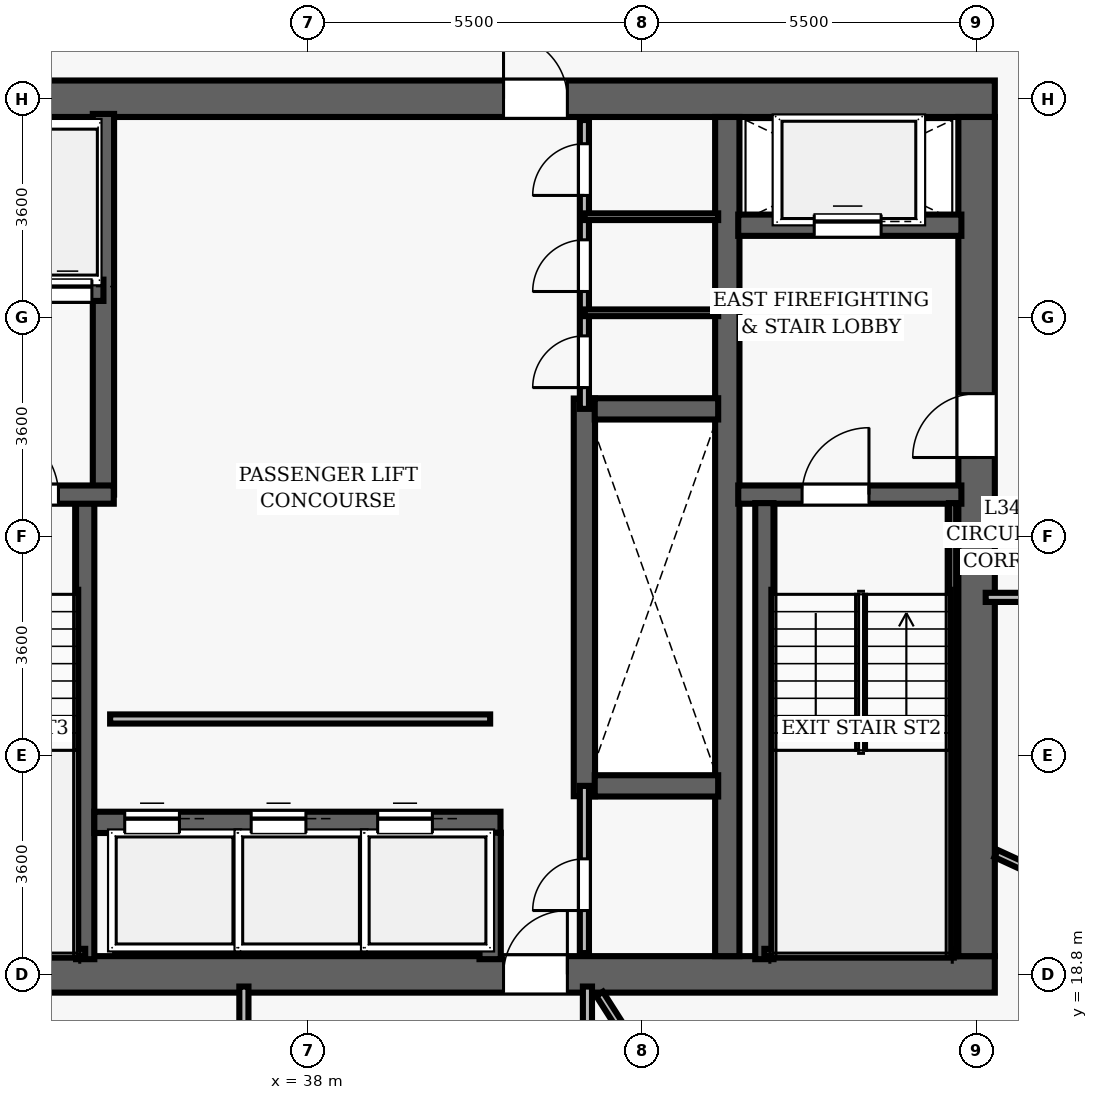
"""IFC4 building model, lengths in metres.
Left out: names, types, materials, properties, quantities, classifications, styles, units other than length and angle.
Written with IfcOpenShell. Run it as: python <this file> out.ifc"""

import sys

from ifc_helpers import new_model, si_unit, direction, frame, frame_2d, origin, place, context, subcontext, project, spatial, rectangle, extrude, element, fill, save


model = new_model("IFC4")
c1 = context("Model", 3, precision=1e-05, world=origin(), true_north=direction((0.0, 1.0)))
c2 = subcontext(c1, "Body", "Model", "MODEL_VIEW")
j1 = project(units=[si_unit("LENGTHUNIT", "METRE"), si_unit("PLANEANGLEUNIT", "RADIAN")], contexts=[c1])
p1 = place(None, origin())
s1 = spatial("IfcSite", under=j1, at=p1, CompositionType="ELEMENT")
p2 = place(p1, origin())
s2 = spatial("IfcBuilding", under=s1, at=p2, CompositionType="ELEMENT")
p3 = place(p2, frame((0.0, 0.0, 137.8)))
s3 = spatial("IfcBuildingStorey", under=s2, at=p3, CompositionType="ELEMENT", Elevation=137.8)
p4 = place(p3, frame((26.7, 18.8, 0.0), z_axis=(0.0, 0.0, 1.0), x_axis=(1.0, 0.0, 0.0)))
e1 = element("IfcWall", 1, at=p4, inside=s3, PredefinedType="SHEAR", context=c2, shape_type="SweptSolid", body=[
    extrude(rectangle(XDim=22.6, YDim=0.6, at=frame_2d((11.3, 0.0))), origin(), (0.0, 0.0, 1.0), 3.5),
])
p5 = place(p4, frame((14.52, 0.0, 0.0)))
e2 = element("IfcOpeningElement", 2, at=p5, cuts=e1, PredefinedType="OPENING", context=c2, shape_type="SweptSolid", body=[
    extrude(rectangle(XDim=1.05, YDim=2.15, at=frame_2d((0.525, 1.075))), frame((0.0, 0.31, 0.0), z_axis=(0.0, -1.0, 0.0), x_axis=(1.0, 0.0, 0.0)), (0.0, 0.0, 1.0), 0.62),
])
p6 = place(p3, frame((26.7, 33.2, 0.0), z_axis=(0.0, 0.0, 1.0), x_axis=(1.0, 0.0, 0.0)))
e3 = element("IfcWall", 3, at=p6, inside=s3, PredefinedType="SHEAR", context=c2, shape_type="SweptSolid", body=[
    extrude(rectangle(XDim=22.6, YDim=0.6, at=frame_2d((11.3, 0.0))), origin(), (0.0, 0.0, 1.0), 3.5),
])
p7 = place(p6, frame((4.62, 0.0, 0.0)))
e4 = element("IfcOpeningElement", 4, at=p7, cuts=e3, PredefinedType="OPENING", context=c2, shape_type="SweptSolid", body=[
    extrude(rectangle(XDim=1.05, YDim=2.15, at=frame_2d((0.525, 1.075))), frame((0.0, 0.31, 0.0), z_axis=(0.0, -1.0, 0.0), x_axis=(1.0, 0.0, 0.0)), (0.0, 0.0, 1.0), 0.62),
])
p8 = place(p6, frame((14.52, 0.0, 0.0)))
e5 = element("IfcOpeningElement", 5, at=p8, cuts=e3, PredefinedType="OPENING", context=c2, shape_type="SweptSolid", body=[
    extrude(rectangle(XDim=1.05, YDim=2.15, at=frame_2d((0.525, 1.075))), frame((0.0, 0.31, 0.0), z_axis=(0.0, -1.0, 0.0), x_axis=(1.0, 0.0, 0.0)), (0.0, 0.0, 1.0), 0.62),
])
p9 = place(p3, frame((49.0, 19.1, 0.0), z_axis=(0.0, 0.0, 1.0), x_axis=(0.0, 1.0, 0.0)))
e6 = element("IfcWall", 6, at=p9, inside=s3, PredefinedType="SHEAR", context=c2, shape_type="SweptSolid", body=[
    extrude(rectangle(XDim=13.8, YDim=0.6, at=frame_2d((6.9, 0.0))), origin(), (0.0, 0.0, 1.0), 3.5),
])
p10 = place(p9, frame((8.2, 0.0, 0.0)))
e7 = element("IfcOpeningElement", 7, at=p10, cuts=e6, PredefinedType="OPENING", context=c2, shape_type="SweptSolid", body=[
    extrude(rectangle(XDim=1.05, YDim=2.15, at=frame_2d((0.525, 1.075))), frame((0.0, 0.31, 0.0), z_axis=(0.0, -1.0, 0.0), x_axis=(1.0, 0.0, 0.0)), (0.0, 0.0, 1.0), 0.62),
])
p11 = place(p3, frame((44.9, 19.1, 0.0), z_axis=(0.0, 0.0, 1.0), x_axis=(0.0, 1.0, 0.0)))
e8 = element("IfcWall", 8, at=p11, inside=s3, PredefinedType="SHEAR", context=c2, shape_type="SweptSolid", body=[
    extrude(rectangle(XDim=13.8, YDim=0.4, at=frame_2d((6.9, 0.0))), origin(), (0.0, 0.0, 1.0), 3.5),
])
p12 = place(p3, frame((45.08, 26.69, 0.0), z_axis=(0.0, 0.0, 1.0), x_axis=(1.0, 0.0, 0.0)))
e9 = element("IfcWall", 9, at=p12, inside=s3, PredefinedType="SHEAR", context=c2, shape_type="SweptSolid", body=[
    extrude(rectangle(XDim=3.67, YDim=0.3, at=frame_2d((1.835, 0.0))), origin(), (0.0, 0.0, 1.0), 3.5),
])
p13 = place(p12, frame((1.05, 0.0, 0.0)))
e10 = element("IfcOpeningElement", 10, at=p13, cuts=e9, PredefinedType="OPENING", context=c2, shape_type="SweptSolid", body=[
    extrude(rectangle(XDim=1.1, YDim=2.15, at=frame_2d((0.55, 1.075))), frame((0.0, 0.16, 0.0), z_axis=(0.0, -1.0, 0.0), x_axis=(1.0, 0.0, 0.0)), (0.0, 0.0, 1.0), 0.32),
])
p14 = place(p3, frame((45.51, 19.05, 0.0), z_axis=(0.0, 0.0, 1.0), x_axis=(0.0, 1.0, 0.0)))
e11 = element("IfcWall", 11, at=p14, inside=s3, PredefinedType="SHEAR", context=c2, shape_type="SweptSolid", body=[
    extrude(rectangle(XDim=7.5, YDim=0.3, at=frame_2d((3.75, 0.0))), origin(), (0.0, 0.0, 1.0), 3.5),
])
p15 = place(p3, frame((48.605, 19.1, 0.0), z_axis=(0.0, 0.0, 1.0), x_axis=(0.0, 1.0, 0.0)))
e12 = element("IfcWall", 12, at=p15, inside=s3, PredefinedType="SHEAR", context=c2, shape_type="SweptSolid", body=[
    extrude(rectangle(XDim=7.45, YDim=0.12, at=frame_2d((3.725, 0.0))), origin(), (0.0, 0.0, 1.0), 3.5),
])
p16 = place(p3, frame((45.51, 19.16, 0.0), z_axis=(0.0, 0.0, 1.0), x_axis=(1.0, 0.0, 0.0)))
e13 = element("IfcWall", 13, at=p16, inside=s3, PredefinedType="SHEAR", context=c2, shape_type="SweptSolid", body=[
    extrude(rectangle(XDim=3.095, YDim=0.12, at=frame_2d((1.547, 0.0))), origin(), (0.0, 0.0, 1.0), 3.5),
])
p17 = place(p3, frame((45.08, 31.12, 0.0), z_axis=(0.0, 0.0, 1.0), x_axis=(1.0, 0.0, 0.0)))
e14 = element("IfcWall", 14, at=p17, inside=s3, PredefinedType="SHEAR", context=c2, shape_type="SweptSolid", body=[
    extrude(rectangle(XDim=3.67, YDim=0.35, at=frame_2d((1.835, 0.0))), origin(), (0.0, 0.0, 1.0), 2.675),
])
p18 = place(p17, frame((1.25, 0.0, 0.0)))
e15 = element("IfcOpeningElement", 15, at=p18, cuts=e14, PredefinedType="OPENING", context=c2, shape_type="SweptSolid", body=[
    extrude(rectangle(XDim=1.1, YDim=2.15, at=frame_2d((0.55, 1.075))), frame((0.0, 0.185, 0.0), z_axis=(0.0, -1.0, 0.0), x_axis=(1.0, 0.0, 0.0)), (0.0, 0.0, 1.0), 0.37),
])
p19 = place(p3, frame((34.34, 19.05, 0.0), z_axis=(0.0, 0.0, 1.0), x_axis=(0.0, 1.0, 0.0)))
e16 = element("IfcWall", 16, at=p19, inside=s3, PredefinedType="SHEAR", context=c2, shape_type="SweptSolid", body=[
    extrude(rectangle(XDim=7.5, YDim=0.3, at=frame_2d((3.75, 0.0))), origin(), (0.0, 0.0, 1.0), 3.5),
])
p20 = place(p3, frame((34.64, 26.69, 0.0), z_axis=(0.0, 0.0, 1.0), x_axis=(0.0, 1.0, 0.0)))
e17 = element("IfcWall", 17, at=p20, inside=s3, PredefinedType="SHEAR", context=c2, shape_type="SweptSolid", body=[
    extrude(rectangle(XDim=6.26, YDim=0.35, at=frame_2d((3.13, 0.0))), origin(), (0.0, 0.0, 1.0), 3.5),
])
p21 = place(p3, frame((31.25, 26.69, 0.0), z_axis=(0.0, 0.0, 1.0), x_axis=(1.0, 0.0, 0.0)))
e18 = element("IfcWall", 18, at=p21, inside=s3, PredefinedType="SHEAR", context=c2, shape_type="SweptSolid", body=[
    extrude(rectangle(XDim=3.56, YDim=0.3, at=frame_2d((1.78, 0.0))), origin(), (0.0, 0.0, 1.0), 3.5),
])
p22 = place(p21, frame((1.55, 0.0, 0.0)))
e19 = element("IfcOpeningElement", 19, at=p22, cuts=e18, PredefinedType="OPENING", context=c2, shape_type="SweptSolid", body=[
    extrude(rectangle(XDim=1.1, YDim=2.15, at=frame_2d((0.55, 1.075))), frame((0.0, 0.16, 0.0), z_axis=(0.0, -1.0, 0.0), x_axis=(1.0, 0.0, 0.0)), (0.0, 0.0, 1.0), 0.32),
])
p23 = place(p3, frame((31.3, 19.16, 0.0), z_axis=(0.0, 0.0, 1.0), x_axis=(1.0, 0.0, 0.0)))
e20 = element("IfcWall", 20, at=p23, inside=s3, PredefinedType="SHEAR", context=c2, shape_type="SweptSolid", body=[
    extrude(rectangle(XDim=3.04, YDim=0.12, at=frame_2d((1.52, 0.0))), origin(), (0.0, 0.0, 1.0), 3.5),
])
p24 = place(p3, frame((32.23, 30.05, 0.0), z_axis=(0.0, 0.0, 1.0), x_axis=(1.0, 0.0, 0.0)))
e21 = element("IfcWall", 21, at=p24, inside=s3, PredefinedType="SHEAR", context=c2, shape_type="SweptSolid", body=[
    extrude(rectangle(XDim=2.41, YDim=0.35, at=frame_2d((1.205, 0.0))), origin(), (0.0, 0.0, 1.0), 2.675),
])
p25 = place(p24, frame((0.42, 0.0, 0.0)))
e22 = element("IfcOpeningElement", 22, at=p25, cuts=e21, PredefinedType="OPENING", context=c2, shape_type="SweptSolid", body=[
    extrude(rectangle(XDim=0.8, YDim=2.15, at=frame_2d((0.4, 1.075))), frame((0.0, 0.185, 0.0), z_axis=(0.0, -1.0, 0.0), x_axis=(1.0, 0.0, 0.0)), (0.0, 0.0, 1.0), 0.37),
])
p26 = place(p24, frame((1.42, 0.0, 0.0)))
e23 = element("IfcOpeningElement", 23, at=p26, cuts=e21, PredefinedType="OPENING", context=c2, shape_type="SweptSolid", body=[
    extrude(rectangle(XDim=0.8, YDim=2.15, at=frame_2d((0.4, 1.075))), frame((0.0, 0.185, 0.0), z_axis=(0.0, -1.0, 0.0), x_axis=(1.0, 0.0, 0.0)), (0.0, 0.0, 1.0), 0.37),
])
p27 = place(p3, frame((42.55, 21.73, 0.0), z_axis=(0.0, 0.0, 1.0), x_axis=(0.0, 1.0, 0.0)))
e24 = element("IfcWall", 24, at=p27, inside=s3, PredefinedType="SHEAR", context=c2, shape_type="SweptSolid", body=[
    extrude(rectangle(XDim=6.54, YDim=0.35, at=frame_2d((3.27, 0.0))), origin(), (0.0, 0.0, 1.0), 2.675),
])
for number, where, z_axis, x_axis in (
    (25, (42.72, 21.9, 0.0), (0.0, 0.0, 1.0), (1.0, 0.0, 0.0)),
    (26, (42.72, 28.1, 0.0), (0.0, 0.0, 1.0), (1.0, 0.0, 0.0)),
):
    element("IfcWall", number, at=place(p3, frame(where, z_axis=z_axis, x_axis=x_axis)), inside=s3, PredefinedType="SHEAR", context=c2, shape_type="SweptSolid", body=[
        extrude(rectangle(XDim=2.03, YDim=0.35, at=frame_2d((1.015, 0.0))), origin(), (0.0, 0.0, 1.0), 2.675),
    ])
p28 = place(p3, frame((34.49, 21.3, 0.0), z_axis=(0.0, 0.0, 1.0), x_axis=(1.0, 0.0, 0.0)))
e27 = element("IfcWall", 27, at=p28, inside=s3, PredefinedType="SHEAR", context=c2, shape_type="SweptSolid", body=[
    extrude(rectangle(XDim=6.68, YDim=0.35, at=frame_2d((3.34, 0.0))), origin(), (0.0, 0.0, 1.0), 2.675),
])
p29 = place(p28, frame((0.5, 0.0, 0.0)))
e28 = element("IfcOpeningElement", 28, at=p29, cuts=e27, PredefinedType="OPENING", context=c2, shape_type="SweptSolid", body=[
    extrude(rectangle(XDim=0.9, YDim=2.15, at=frame_2d((0.45, 1.075))), frame((0.0, 0.185, 0.0), z_axis=(0.0, -1.0, 0.0), x_axis=(1.0, 0.0, 0.0)), (0.0, 0.0, 1.0), 0.37),
])
p30 = place(p28, frame((2.58, 0.0, 0.0)))
e29 = element("IfcOpeningElement", 29, at=p30, cuts=e27, PredefinedType="OPENING", context=c2, shape_type="SweptSolid", body=[
    extrude(rectangle(XDim=0.9, YDim=2.15, at=frame_2d((0.45, 1.075))), frame((0.0, 0.185, 0.0), z_axis=(0.0, -1.0, 0.0), x_axis=(1.0, 0.0, 0.0)), (0.0, 0.0, 1.0), 0.37),
])
p31 = place(p28, frame((4.66, 0.0, 0.0)))
e30 = element("IfcOpeningElement", 30, at=p31, cuts=e27, PredefinedType="OPENING", context=c2, shape_type="SweptSolid", body=[
    extrude(rectangle(XDim=0.9, YDim=2.15, at=frame_2d((0.45, 1.075))), frame((0.0, 0.185, 0.0), z_axis=(0.0, -1.0, 0.0), x_axis=(1.0, 0.0, 0.0)), (0.0, 0.0, 1.0), 0.37),
])
p32 = place(p3, frame((41.0, 19.05, 0.0), z_axis=(0.0, 0.0, 1.0), x_axis=(0.0, 1.0, 0.0)))
e31 = element("IfcWall", 31, at=p32, inside=s3, PredefinedType="SHEAR", context=c2, shape_type="SweptSolid", body=[
    extrude(rectangle(XDim=2.08, YDim=0.35, at=frame_2d((1.04, 0.0))), origin(), (0.0, 0.0, 1.0), 2.675),
])
p33 = place(p3, frame((34.75, 23.0, 0.0), z_axis=(0.0, 0.0, 1.0), x_axis=(1.0, 0.0, 0.0)))
e32 = element("IfcWall", 32, at=p33, inside=s3, PredefinedType="PARTITIONING", context=c2, shape_type="SweptSolid", body=[
    extrude(rectangle(XDim=6.25, YDim=0.15, at=frame_2d((3.125, 0.0))), origin(), (0.0, 0.0, 1.0), 2.675),
])
p34 = place(p3, frame((42.55, 28.1, 0.0), z_axis=(0.0, 0.0, 1.0), x_axis=(0.0, 1.0, 0.0)))
e33 = element("IfcWall", 33, at=p34, inside=s3, PredefinedType="PARTITIONING", context=c2, shape_type="SweptSolid", body=[
    extrude(rectangle(XDim=4.75, YDim=0.15, at=frame_2d((2.375, 0.0))), origin(), (0.0, 0.0, 1.0), 2.675),
])
p35 = place(p34, frame((0.35, 0.0, 0.0)))
e34 = element("IfcOpeningElement", 34, at=p35, cuts=e33, PredefinedType="OPENING", context=c2, shape_type="SweptSolid", body=[
    extrude(rectangle(XDim=0.85, YDim=2.1, at=frame_2d((0.425, 1.05))), frame((0.0, 0.085, 0.0), z_axis=(0.0, -1.0, 0.0), x_axis=(1.0, 0.0, 0.0)), (0.0, 0.0, 1.0), 0.17),
])
p36 = place(p34, frame((1.93, 0.0, 0.0)))
e35 = element("IfcOpeningElement", 35, at=p36, cuts=e33, PredefinedType="OPENING", context=c2, shape_type="SweptSolid", body=[
    extrude(rectangle(XDim=0.85, YDim=2.1, at=frame_2d((0.425, 1.05))), frame((0.0, 0.085, 0.0), z_axis=(0.0, -1.0, 0.0), x_axis=(1.0, 0.0, 0.0)), (0.0, 0.0, 1.0), 0.17),
])
p37 = place(p34, frame((3.51, 0.0, 0.0)))
e36 = element("IfcOpeningElement", 36, at=p37, cuts=e33, PredefinedType="OPENING", context=c2, shape_type="SweptSolid", body=[
    extrude(rectangle(XDim=0.85, YDim=2.1, at=frame_2d((0.425, 1.05))), frame((0.0, 0.085, 0.0), z_axis=(0.0, -1.0, 0.0), x_axis=(1.0, 0.0, 0.0)), (0.0, 0.0, 1.0), 0.17),
])
for number, where, z_axis, x_axis in (
    (37, (42.55, 29.68, 0.0), (0.0, 0.0, 1.0), (1.0, 0.0, 0.0)),
    (38, (42.55, 31.26, 0.0), (0.0, 0.0, 1.0), (1.0, 0.0, 0.0)),
):
    element("IfcWall", number, at=place(p3, frame(where, z_axis=z_axis, x_axis=x_axis)), inside=s3, PredefinedType="PARTITIONING", context=c2, shape_type="SweptSolid", body=[
        extrude(rectangle(XDim=2.2, YDim=0.11, at=frame_2d((1.1, 0.0))), origin(), (0.0, 0.0, 1.0), 2.675),
    ])
p38 = place(p3, frame((42.55, 19.15, 0.0), z_axis=(0.0, 0.0, 1.0), x_axis=(0.0, 1.0, 0.0)))
e39 = element("IfcWall", 39, at=p38, inside=s3, PredefinedType="PARTITIONING", context=c2, shape_type="SweptSolid", body=[
    extrude(rectangle(XDim=2.75, YDim=0.15, at=frame_2d((1.375, 0.0))), origin(), (0.0, 0.0, 1.0), 2.675),
])
p39 = place(p38, frame((0.7, 0.0, 0.0)))
e40 = element("IfcOpeningElement", 40, at=p39, cuts=e39, PredefinedType="OPENING", context=c2, shape_type="SweptSolid", body=[
    extrude(rectangle(XDim=0.85, YDim=2.1, at=frame_2d((0.425, 1.05))), frame((0.0, 0.085, 0.0), z_axis=(0.0, -1.0, 0.0), x_axis=(1.0, 0.0, 0.0)), (0.0, 0.0, 1.0), 0.17),
])
p40 = place(p3, frame((49.15, 25.0, 0.0), z_axis=(0.0, 0.0, 1.0), x_axis=(1.0, 0.0, 0.0)))
e41 = element("IfcWall", 41, at=p40, inside=s3, PredefinedType="PARTITIONING", context=c2, shape_type="SweptSolid", body=[
    extrude(rectangle(XDim=12.35, YDim=0.15, at=frame_2d((6.175, 0.0))), origin(), (0.0, 0.0, 1.0), 2.675),
])
p41 = place(p40, frame((2.613, 0.0, 0.0)))
e42 = element("IfcOpeningElement", 42, at=p41, cuts=e41, PredefinedType="OPENING", context=c2, shape_type="SweptSolid", body=[
    extrude(rectangle(XDim=0.95, YDim=2.15, at=frame_2d((0.475, 1.075))), frame((0.0, 0.085, 0.0), z_axis=(0.0, -1.0, 0.0), x_axis=(1.0, 0.0, 0.0)), (0.0, 0.0, 1.0), 0.17),
])
p42 = place(p3, frame((36.95, 11.2, 0.0), z_axis=(0.0, 0.0, 1.0), x_axis=(0.0, 1.0, 0.0)))
e43 = element("IfcWall", 43, at=p42, inside=s3, PredefinedType="PARTITIONING", context=c2, shape_type="SweptSolid", body=[
    extrude(rectangle(XDim=7.4, YDim=0.15, at=frame_2d((3.7, 0.0))), origin(), (0.0, 0.0, 1.0), 2.675),
])
p43 = place(p42, frame((5.075, 0.0, 0.0)))
e44 = element("IfcOpeningElement", 44, at=p43, cuts=e43, PredefinedType="OPENING", context=c2, shape_type="SweptSolid", body=[
    extrude(rectangle(XDim=0.95, YDim=2.15, at=frame_2d((0.475, 1.075))), frame((0.0, 0.085, 0.0), z_axis=(0.0, -1.0, 0.0), x_axis=(1.0, 0.0, 0.0)), (0.0, 0.0, 1.0), 0.17),
])
p44 = place(p3, frame((42.6, 16.65, 0.0), z_axis=(0.0, 0.0, 1.0), x_axis=(0.0, 1.0, 0.0)))
e45 = element("IfcWall", 45, at=p44, inside=s3, PredefinedType="PARTITIONING", context=c2, shape_type="SweptSolid", body=[
    extrude(rectangle(XDim=1.95, YDim=0.15, at=frame_2d((0.975, 0.0))), origin(), (0.0, 0.0, 1.0), 2.675),
])
p45 = place(p3, frame((42.799, 18.48, 0.0), z_axis=(0.0, 0.0, 1.0), x_axis=(0.537969305378, -0.842964427762, 0.0)))
e46 = element("IfcWall", 46, at=p45, inside=s3, PredefinedType="PARTITIONING", context=c2, shape_type="SweptSolid", body=[
    extrude(rectangle(XDim=18.19, YDim=0.13, at=frame_2d((9.095, 0.0))), origin(), (0.0, 0.0, 1.0), 2.675),
])
p46 = place(p3, frame((49.32, 20.787, 0.0), z_axis=(0.0, 0.0, 1.0), x_axis=(0.90831109322, -0.418295299918, 0.0)))
e47 = element("IfcWall", 47, at=p46, inside=s3, PredefinedType="PARTITIONING", context=c2, shape_type="SweptSolid", body=[
    extrude(rectangle(XDim=18.086, YDim=0.13, at=frame_2d((9.043, 0.0))), origin(), (0.0, 0.0, 1.0), 2.675),
])
p47 = place(p13, origin())
e48 = element("IfcDoor", 48, at=p47, inside=s3, OperationType="SINGLE_SWING_RIGHT", PredefinedType="DOOR", context=c2, shape_type="SweptSolid", body=[
    extrude(rectangle(XDim=1.1, YDim=2.15, at=frame_2d((0.55, 1.075))), frame((0.0, 0.025, 0.0), z_axis=(0.0, -1.0, 0.0), x_axis=(1.0, 0.0, 0.0)), (0.0, 0.0, 1.0), 0.05),
])
fill(e10, e48)
p48 = place(p10, origin())
e49 = element("IfcDoor", 49, at=p48, inside=s3, OperationType="SINGLE_SWING_LEFT", PredefinedType="DOOR", context=c2, shape_type="SweptSolid", body=[
    extrude(rectangle(XDim=1.05, YDim=2.15, at=frame_2d((0.525, 1.075))), frame((0.0, 0.025, 0.0), z_axis=(0.0, -1.0, 0.0), x_axis=(1.0, 0.0, 0.0)), (0.0, 0.0, 1.0), 0.05),
])
fill(e7, e49)
p49 = place(p22, origin())
e50 = element("IfcDoor", 50, at=p49, inside=s3, OperationType="SINGLE_SWING_LEFT", PredefinedType="DOOR", context=c2, shape_type="SweptSolid", body=[
    extrude(rectangle(XDim=1.1, YDim=2.15, at=frame_2d((0.55, 1.075))), frame((0.0, 0.025, 0.0), z_axis=(0.0, -1.0, 0.0), x_axis=(1.0, 0.0, 0.0)), (0.0, 0.0, 1.0), 0.05),
])
fill(e19, e50)
p50 = place(p8, origin())
e51 = element("IfcDoor", 51, at=p50, inside=s3, OperationType="SINGLE_SWING_LEFT", PredefinedType="DOOR", context=c2, shape_type="SweptSolid", body=[
    extrude(rectangle(XDim=1.05, YDim=2.15, at=frame_2d((0.525, 1.075))), frame((0.0, 0.025, 0.0), z_axis=(0.0, -1.0, 0.0), x_axis=(1.0, 0.0, 0.0)), (0.0, 0.0, 1.0), 0.05),
])
fill(e5, e51)
p51 = place(p5, origin())
e52 = element("IfcDoor", 52, at=p51, inside=s3, OperationType="SINGLE_SWING_RIGHT", PredefinedType="DOOR", context=c2, shape_type="SweptSolid", body=[
    extrude(rectangle(XDim=1.05, YDim=2.15, at=frame_2d((0.525, 1.075))), frame((0.0, 0.025, 0.0), z_axis=(0.0, -1.0, 0.0), x_axis=(1.0, 0.0, 0.0)), (0.0, 0.0, 1.0), 0.05),
])
fill(e2, e52)
p52 = place(p35, origin())
e53 = element("IfcDoor", 53, at=p52, inside=s3, OperationType="SINGLE_SWING_LEFT", PredefinedType="DOOR", context=c2, shape_type="SweptSolid", body=[
    extrude(rectangle(XDim=0.85, YDim=2.1, at=frame_2d((0.425, 1.05))), frame((0.0, 0.025, 0.0), z_axis=(0.0, -1.0, 0.0), x_axis=(1.0, 0.0, 0.0)), (0.0, 0.0, 1.0), 0.05),
])
fill(e34, e53)
p53 = place(p36, origin())
e54 = element("IfcDoor", 54, at=p53, inside=s3, OperationType="SINGLE_SWING_LEFT", PredefinedType="DOOR", context=c2, shape_type="SweptSolid", body=[
    extrude(rectangle(XDim=0.85, YDim=2.1, at=frame_2d((0.425, 1.05))), frame((0.0, 0.025, 0.0), z_axis=(0.0, -1.0, 0.0), x_axis=(1.0, 0.0, 0.0)), (0.0, 0.0, 1.0), 0.05),
])
fill(e35, e54)
p54 = place(p37, origin())
e55 = element("IfcDoor", 55, at=p54, inside=s3, OperationType="SINGLE_SWING_LEFT", PredefinedType="DOOR", context=c2, shape_type="SweptSolid", body=[
    extrude(rectangle(XDim=0.85, YDim=2.1, at=frame_2d((0.425, 1.05))), frame((0.0, 0.025, 0.0), z_axis=(0.0, -1.0, 0.0), x_axis=(1.0, 0.0, 0.0)), (0.0, 0.0, 1.0), 0.05),
])
fill(e36, e55)
p55 = place(p39, origin())
e56 = element("IfcDoor", 56, at=p55, inside=s3, OperationType="SINGLE_SWING_LEFT", PredefinedType="DOOR", context=c2, shape_type="SweptSolid", body=[
    extrude(rectangle(XDim=0.85, YDim=2.1, at=frame_2d((0.425, 1.05))), frame((0.0, 0.025, 0.0), z_axis=(0.0, -1.0, 0.0), x_axis=(1.0, 0.0, 0.0)), (0.0, 0.0, 1.0), 0.05),
])
fill(e40, e56)
p56 = place(p29, origin())
e57 = element("IfcDoor", 57, at=p56, inside=s3, OperationType="SLIDING_TO_LEFT", PredefinedType="DOOR", context=c2, shape_type="SweptSolid", body=[
    extrude(rectangle(XDim=0.9, YDim=2.15, at=frame_2d((0.45, 1.075))), frame((0.0, 0.025, 0.0), z_axis=(0.0, -1.0, 0.0), x_axis=(1.0, 0.0, 0.0)), (0.0, 0.0, 1.0), 0.05),
])
fill(e28, e57)
p57 = place(p30, origin())
e58 = element("IfcDoor", 58, at=p57, inside=s3, OperationType="SLIDING_TO_LEFT", PredefinedType="DOOR", context=c2, shape_type="SweptSolid", body=[
    extrude(rectangle(XDim=0.9, YDim=2.15, at=frame_2d((0.45, 1.075))), frame((0.0, 0.025, 0.0), z_axis=(0.0, -1.0, 0.0), x_axis=(1.0, 0.0, 0.0)), (0.0, 0.0, 1.0), 0.05),
])
fill(e29, e58)
p58 = place(p31, origin())
e59 = element("IfcDoor", 59, at=p58, inside=s3, OperationType="SLIDING_TO_LEFT", PredefinedType="DOOR", context=c2, shape_type="SweptSolid", body=[
    extrude(rectangle(XDim=0.9, YDim=2.15, at=frame_2d((0.45, 1.075))), frame((0.0, 0.025, 0.0), z_axis=(0.0, -1.0, 0.0), x_axis=(1.0, 0.0, 0.0)), (0.0, 0.0, 1.0), 0.05),
])
fill(e30, e59)
p59 = place(p18, origin())
e60 = element("IfcDoor", 60, at=p59, inside=s3, OperationType="SLIDING_TO_LEFT", PredefinedType="DOOR", context=c2, shape_type="SweptSolid", body=[
    extrude(rectangle(XDim=1.1, YDim=2.15, at=frame_2d((0.55, 1.075))), frame((0.0, 0.025, 0.0), z_axis=(0.0, -1.0, 0.0), x_axis=(1.0, 0.0, 0.0)), (0.0, 0.0, 1.0), 0.05),
])
fill(e15, e60)
p60 = place(p26, origin())
e61 = element("IfcDoor", 61, at=p60, inside=s3, OperationType="SLIDING_TO_LEFT", PredefinedType="DOOR", context=c2, shape_type="SweptSolid", body=[
    extrude(rectangle(XDim=0.8, YDim=2.15, at=frame_2d((0.4, 1.075))), frame((0.0, 0.025, 0.0), z_axis=(0.0, -1.0, 0.0), x_axis=(1.0, 0.0, 0.0)), (0.0, 0.0, 1.0), 0.05),
])
fill(e23, e61)
save(model, sys.argv[1])
